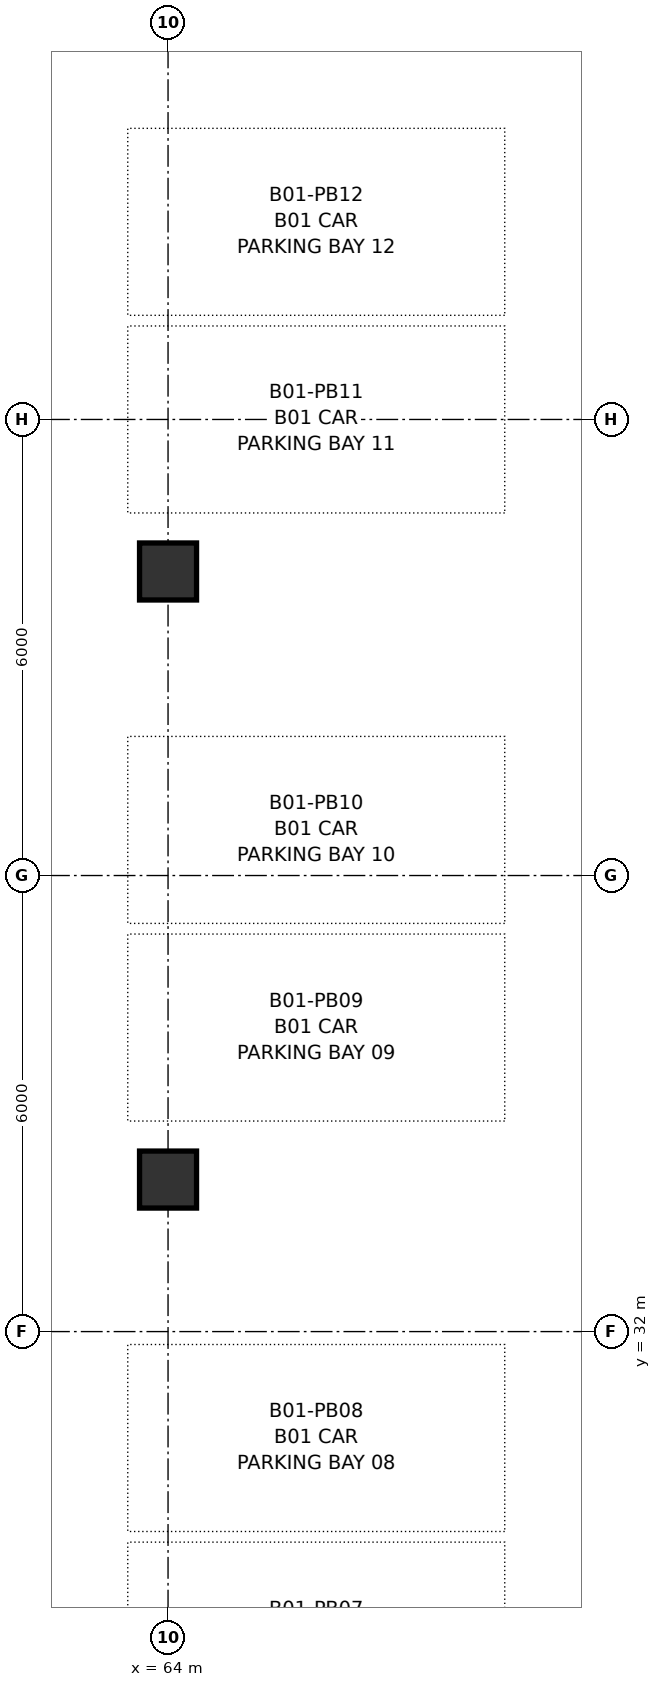
"""IFC4 building model, lengths in metres.
Left out: names, types, materials, properties, quantities, classifications, styles, units other than length and angle.
Written with IfcOpenShell. Run it as: python <this file> out.ifc"""

import sys

from ifc_helpers import new_model, si_unit, direction, frame, origin, origin_2d, place, context, subcontext, project, spatial, rectangle, extrude, source, transform, mapped, element, save


model = new_model("IFC4")
c1 = context("Model", 3, precision=1e-05, world=origin(), true_north=direction((0.0, 1.0)))
c2 = subcontext(c1, "Body", "Model", "MODEL_VIEW")
j1 = project(units=[si_unit("LENGTHUNIT", "METRE"), si_unit("PLANEANGLEUNIT", "RADIAN")], contexts=[c1])
p1 = place(None, origin())
s1 = spatial("IfcSite", under=j1, at=p1, CompositionType="ELEMENT")
p2 = place(p1, origin())
s2 = spatial("IfcBuilding", under=s1, at=p2, CompositionType="ELEMENT")
p3 = place(p2, frame((0.0, 0.0, -4.2)))
s3 = spatial("IfcBuildingStorey", under=s2, at=p3, CompositionType="ELEMENT", Elevation=-4.2)
m1 = source(origin(), c2, "Body", "SweptSolid", [
    extrude(rectangle(XDim=0.75, YDim=0.75, at=origin_2d()), origin(), (0.0, 0.0, 1.0), 3.985),
])
for number, where, z_axis, x_axis in (
    (1, (64.0, 34.0, 0.0), (0.0, 0.0, 1.0), (1.0, 0.0, 0.0)),
    (2, (64.0, 42.0, 0.0), (0.0, 0.0, 1.0), (1.0, 0.0, 0.0)),
):
    element("IfcColumn", number, at=place(p3, frame(where, z_axis=z_axis, x_axis=x_axis)), inside=s3, PredefinedType="COLUMN", context=c2, shape_type="MappedRepresentation", body=[
        mapped(m1, transform((0.0, 0.0, 0.0), x_axis=(1.0, 0.0, 0.0), y_axis=(0.0, 1.0, 0.0), z_axis=(0.0, 0.0, 1.0), scale=1.0)),
    ])
save(model, sys.argv[1])
